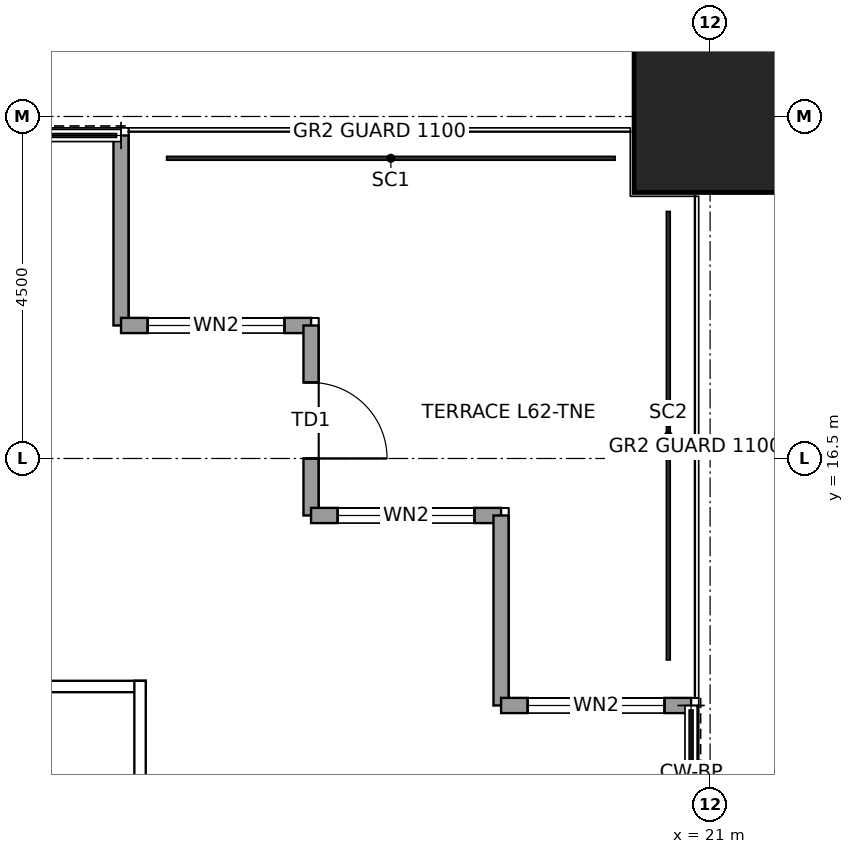
"""IFC4 building model, lengths in metres.
Left out: names, types, materials, properties, quantities, classifications, styles, units other than length and angle.
Written with IfcOpenShell. Run it as: python <this file> out.ifc"""

import sys

from ifc_helpers import new_model, si_unit, direction, frame, frame_2d, origin, origin_2d, place, context, subcontext, project, spatial, rectangle, hollow_rectangle, extrude, element, fill, save


model = new_model("IFC4")
c1 = context("Model", 3, precision=1e-05, world=origin(), true_north=direction((0.0, 1.0)))
c2 = subcontext(c1, "Body", "Model", "MODEL_VIEW")
j1 = project(units=[si_unit("LENGTHUNIT", "METRE"), si_unit("PLANEANGLEUNIT", "RADIAN")], contexts=[c1])
p1 = place(None, origin())
s1 = spatial("IfcSite", under=j1, at=p1, CompositionType="ELEMENT")
p2 = place(p1, origin())
s2 = spatial("IfcBuilding", under=s1, at=p2, CompositionType="ELEMENT")
p3 = place(p2, frame((0.0, 0.0, 283.9)))
s3 = spatial("IfcBuildingStorey", under=s2, at=p3, CompositionType="ELEMENT", Elevation=283.9)
p4 = place(p3, frame((21.0, 21.0, 0.0), z_axis=(0.0, 0.0, 1.0), x_axis=(1.0, 0.0, 0.0)))
e1 = element("IfcColumn", 1, at=p4, inside=s3, PredefinedType="COLUMN", context=c2, shape_type="SweptSolid", body=[
    extrude(hollow_rectangle(XDim=2.0, YDim=2.0, WallThickness=0.095, at=origin_2d()), origin(), (0.0, 0.0, 1.0), 4.0),
])
p5 = place(p3, frame((13.25, 20.75, 0.0), z_axis=(0.0, 0.0, 1.0), x_axis=(0.0, -1.0, 0.0)))
e2 = element("IfcWall", 2, at=p5, inside=s3, PredefinedType="SOLIDWALL", context=c2, shape_type="SweptSolid", body=[
    extrude(rectangle(XDim=2.5, YDim=0.2, at=frame_2d((1.25, 0.0))), origin(), (0.0, 0.0, 1.0), 3.85),
])
p6 = place(p3, frame((13.25, 18.25, 0.0), z_axis=(0.0, 0.0, 1.0), x_axis=(1.0, 0.0, 0.0)))
e3 = element("IfcWall", 3, at=p6, inside=s3, PredefinedType="SOLIDWALL", context=c2, shape_type="SweptSolid", body=[
    extrude(rectangle(XDim=2.5, YDim=0.2, at=frame_2d((1.25, 0.0))), origin(), (0.0, 0.0, 1.0), 3.85),
])
p7 = place(p6, frame((0.35, 0.0, 0.3)))
e4 = element("IfcOpeningElement", 4, at=p7, cuts=e3, PredefinedType="OPENING", context=c2, shape_type="SweptSolid", body=[
    extrude(rectangle(XDim=1.8, YDim=2.4, at=frame_2d((0.9, 1.2))), frame((0.0, 0.11, 0.0), z_axis=(0.0, -1.0, 0.0), x_axis=(1.0, 0.0, 0.0)), (0.0, 0.0, 1.0), 0.22),
])
p8 = place(p3, frame((15.75, 18.25, 0.0), z_axis=(0.0, 0.0, 1.0), x_axis=(0.0, -1.0, 0.0)))
e5 = element("IfcWall", 5, at=p8, inside=s3, PredefinedType="SOLIDWALL", context=c2, shape_type="SweptSolid", body=[
    extrude(rectangle(XDim=2.5, YDim=0.2, at=frame_2d((1.25, 0.0))), origin(), (0.0, 0.0, 1.0), 3.317),
])
p9 = place(p8, frame((0.75, 0.0, 0.0)))
e6 = element("IfcOpeningElement", 6, at=p9, cuts=e5, PredefinedType="OPENING", context=c2, shape_type="SweptSolid", body=[
    extrude(rectangle(XDim=1.0, YDim=2.4, at=frame_2d((0.5, 1.2))), frame((0.0, 0.11, 0.0), z_axis=(0.0, -1.0, 0.0), x_axis=(1.0, 0.0, 0.0)), (0.0, 0.0, 1.0), 0.22),
])
p10 = place(p3, frame((15.75, 15.75, 0.0), z_axis=(0.0, 0.0, 1.0), x_axis=(1.0, 0.0, 0.0)))
e7 = element("IfcWall", 7, at=p10, inside=s3, PredefinedType="SOLIDWALL", context=c2, shape_type="SweptSolid", body=[
    extrude(rectangle(XDim=2.5, YDim=0.2, at=frame_2d((1.25, 0.0))), origin(), (0.0, 0.0, 1.0), 3.85),
])
p11 = place(p10, frame((0.35, 0.0, 0.3)))
e8 = element("IfcOpeningElement", 8, at=p11, cuts=e7, PredefinedType="OPENING", context=c2, shape_type="SweptSolid", body=[
    extrude(rectangle(XDim=1.8, YDim=2.4, at=frame_2d((0.9, 1.2))), frame((0.0, 0.11, 0.0), z_axis=(0.0, -1.0, 0.0), x_axis=(1.0, 0.0, 0.0)), (0.0, 0.0, 1.0), 0.22),
])
p12 = place(p3, frame((18.25, 15.75, 0.0), z_axis=(0.0, 0.0, 1.0), x_axis=(0.0, -1.0, 0.0)))
e9 = element("IfcWall", 9, at=p12, inside=s3, PredefinedType="SOLIDWALL", context=c2, shape_type="SweptSolid", body=[
    extrude(rectangle(XDim=2.5, YDim=0.2, at=frame_2d((1.25, 0.0))), origin(), (0.0, 0.0, 1.0), 3.85),
])
p13 = place(p3, frame((18.25, 13.25, 0.0), z_axis=(0.0, 0.0, 1.0), x_axis=(1.0, 0.0, 0.0)))
e10 = element("IfcWall", 10, at=p13, inside=s3, PredefinedType="SOLIDWALL", context=c2, shape_type="SweptSolid", body=[
    extrude(rectangle(XDim=2.5, YDim=0.2, at=frame_2d((1.25, 0.0))), origin(), (0.0, 0.0, 1.0), 3.85),
])
p14 = place(p13, frame((0.35, 0.0, 0.3)))
e11 = element("IfcOpeningElement", 11, at=p14, cuts=e10, PredefinedType="OPENING", context=c2, shape_type="SweptSolid", body=[
    extrude(rectangle(XDim=1.8, YDim=2.4, at=frame_2d((0.9, 1.2))), frame((0.0, 0.11, 0.0), z_axis=(0.0, -1.0, 0.0), x_axis=(1.0, 0.0, 0.0)), (0.0, 0.0, 1.0), 0.22),
])
p15 = place(p3, frame((7.425, 13.5, 0.0), z_axis=(0.0, 0.0, 1.0), x_axis=(1.0, 0.0, 0.0)))
e12 = element("IfcWall", 12, at=p15, inside=s3, PredefinedType="PARTITIONING", context=c2, shape_type="SweptSolid", body=[
    extrude(rectangle(XDim=6.15, YDim=0.15, at=frame_2d((3.075, 0.0))), origin(), (0.0, 0.0, 1.0), 3.85),
])
p16 = place(p3, frame((13.5, -13.575, 0.0), z_axis=(0.0, 0.0, 1.0), x_axis=(0.0, 1.0, 0.0)))
e13 = element("IfcWall", 13, at=p16, inside=s3, PredefinedType="PARTITIONING", context=c2, shape_type="SweptSolid", body=[
    extrude(rectangle(XDim=27.15, YDim=0.15, at=frame_2d((13.575, 0.0))), origin(), (0.0, 0.0, 1.0), 3.85),
])
p17 = place(p7, origin())
e14 = element("IfcWindow", 14, at=p17, inside=s3, PartitioningType="SINGLE_PANEL", PredefinedType="WINDOW", context=c2, shape_type="SweptSolid", body=[
    extrude(rectangle(XDim=1.8, YDim=2.4, at=frame_2d((0.9, 1.2))), frame((0.0, 0.03, 0.0), z_axis=(0.0, -1.0, 0.0), x_axis=(1.0, 0.0, 0.0)), (0.0, 0.0, 1.0), 0.06),
])
fill(e4, e14)
p18 = place(p9, origin())
e15 = element("IfcDoor", 15, at=p18, inside=s3, OperationType="SINGLE_SWING_RIGHT", PredefinedType="DOOR", context=c2, shape_type="SweptSolid", body=[
    extrude(rectangle(XDim=1.0, YDim=2.4, at=frame_2d((0.5, 1.2))), frame((0.0, 0.025, 0.0), z_axis=(0.0, -1.0, 0.0), x_axis=(1.0, 0.0, 0.0)), (0.0, 0.0, 1.0), 0.05),
])
fill(e6, e15)
p19 = place(p11, origin())
e16 = element("IfcWindow", 16, at=p19, inside=s3, PartitioningType="SINGLE_PANEL", PredefinedType="WINDOW", context=c2, shape_type="SweptSolid", body=[
    extrude(rectangle(XDim=1.8, YDim=2.4, at=frame_2d((0.9, 1.2))), frame((0.0, 0.03, 0.0), z_axis=(0.0, -1.0, 0.0), x_axis=(1.0, 0.0, 0.0)), (0.0, 0.0, 1.0), 0.06),
])
fill(e8, e16)
p20 = place(p14, origin())
e17 = element("IfcWindow", 17, at=p20, inside=s3, PartitioningType="SINGLE_PANEL", PredefinedType="WINDOW", context=c2, shape_type="SweptSolid", body=[
    extrude(rectangle(XDim=1.8, YDim=2.4, at=frame_2d((0.9, 1.2))), frame((0.0, 0.03, 0.0), z_axis=(0.0, -1.0, 0.0), x_axis=(1.0, 0.0, 0.0)), (0.0, 0.0, 1.0), 0.06),
])
fill(e11, e17)
save(model, sys.argv[1])
